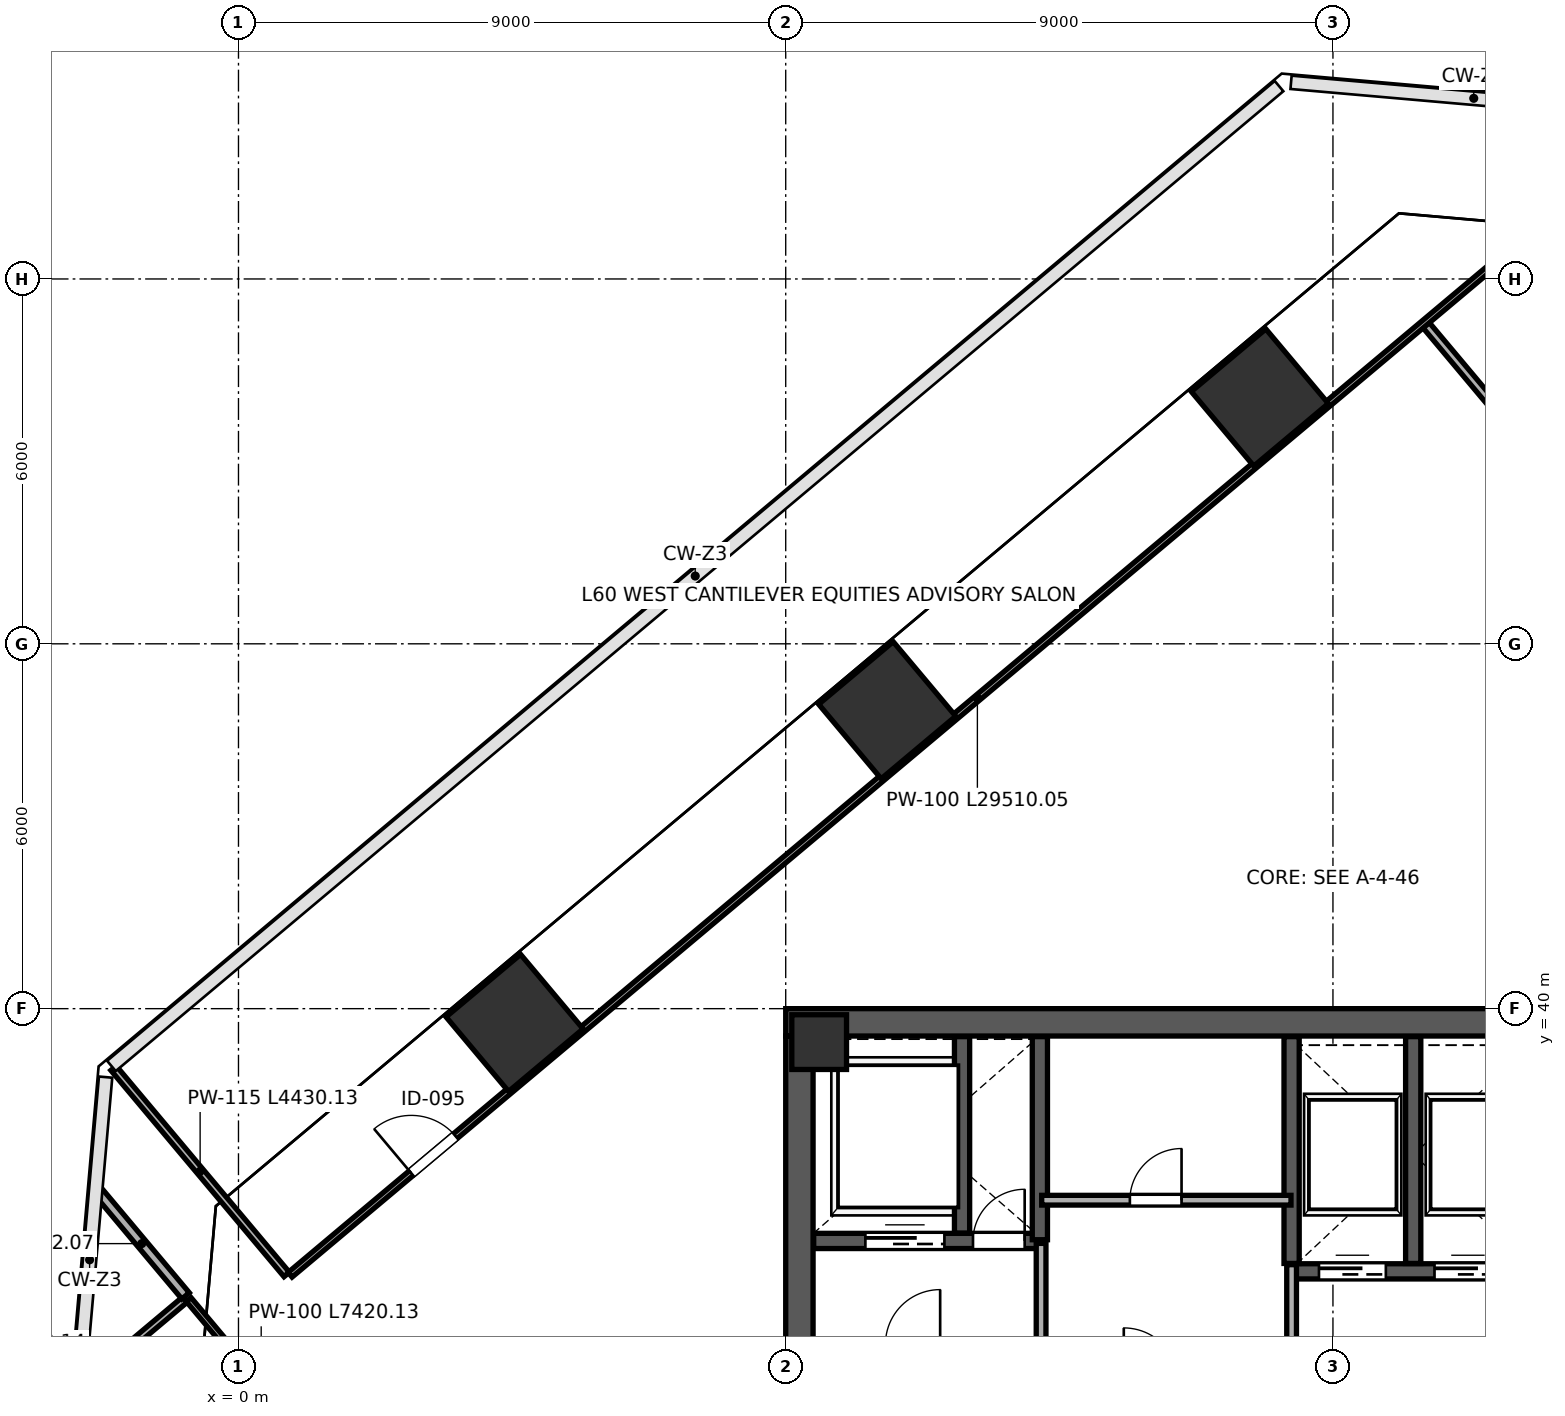
"""IFC4 building model, lengths in metres.
Left out: names, types, materials, properties, quantities, classifications, styles, units other than length and angle.
Written with IfcOpenShell. Run it as: python <this file> out.ifc"""

import sys

from ifc_helpers import new_model, si_unit, direction, frame, frame_2d, origin, origin_2d, place, context, subcontext, project, spatial, rectangle, extrude, source, transform, mapped, element, fill, save


model = new_model("IFC4")
c1 = context("Model", 3, precision=1e-05, world=origin(), true_north=direction((0.0, 1.0)))
c2 = subcontext(c1, "Body", "Model", "MODEL_VIEW")
j1 = project(units=[si_unit("LENGTHUNIT", "METRE"), si_unit("PLANEANGLEUNIT", "RADIAN")], contexts=[c1])
p1 = place(None, origin())
s1 = spatial("IfcSite", under=j1, at=p1, CompositionType="ELEMENT")
p2 = place(p1, origin())
s2 = spatial("IfcBuilding", under=s1, at=p2, CompositionType="ELEMENT")
p3 = place(p2, frame((0.0, 0.0, 266.8)))
s3 = spatial("IfcBuildingStorey", under=s2, at=p3, CompositionType="ELEMENT", Elevation=266.8)
m1 = source(origin(), c2, "Body", "SweptSolid", [
    extrude(rectangle(XDim=0.9, YDim=0.9, at=origin_2d()), origin(), (0.0, 0.0, 1.0), 4.198),
])
p4 = place(p3, frame((9.55, 39.45, 0.001), z_axis=(0.0, 0.0, 1.0), x_axis=(1.0, 0.0, 0.0)))
e1 = element("IfcColumn", 1, at=p4, inside=s3, PredefinedType="COLUMN", context=c2, shape_type="MappedRepresentation", body=[
    mapped(m1, transform((0.0, 0.0, 0.0), scale=1.0)),
])
m2 = source(origin(), c2, "Body", "SweptSolid", [
    extrude(rectangle(XDim=1.6, YDim=1.6, at=origin_2d()), origin(), (0.0, 0.0, 1.0), 4.198),
])
for number, where, z_axis, x_axis in (
    (2, (4.541, 39.765, 0.001), (0.0, 0.0, 1.0), (-0.643, 0.766, 0.0)),
    (3, (10.669, 44.908, 0.001), (0.0, 0.0, 1.0), (-0.643, 0.766, 0.0)),
    (4, (16.797, 50.05, 0.001), (0.0, 0.0, 1.0), (-0.643, 0.766, 0.0)),
):
    element("IfcColumn", number, at=place(p3, frame(where, z_axis=z_axis, x_axis=x_axis)), inside=s3, PredefinedType="COLUMN", context=c2, shape_type="MappedRepresentation", body=[
        mapped(m2, transform((0.0, 0.0, 0.0), scale=1.0)),
    ])
p5 = place(p3, frame((9.225, 24.45, 0.0), z_axis=(0.0, 0.0, 1.0), x_axis=(0.0, 1.0, 0.0)))
e5 = element("IfcWall", 5, at=p5, inside=s3, PredefinedType="SHEAR", context=c2, shape_type="SweptSolid", body=[
    extrude(rectangle(XDim=15.1, YDim=0.45, at=frame_2d((7.55, 0.0))), origin(), (0.0, 0.0, 1.0), 3.96),
])
p6 = place(p5, frame((8.7, 0.0, 0.0)))
e6 = element("IfcOpeningElement", 6, at=p6, cuts=e5, PredefinedType="OPENING", context=c2, shape_type="SweptSolid", body=[
    extrude(rectangle(XDim=1.15, YDim=2.2, at=frame_2d((0.575, 1.1))), frame((0.0, 0.235, 0.0), z_axis=(0.0, -1.0, 0.0), x_axis=(1.0, 0.0, 0.0)), (0.0, 0.0, 1.0), 0.47),
])
p7 = place(p3, frame((9.0, 39.775, 0.0), z_axis=(0.0, 0.0, 1.0), x_axis=(1.0, 0.0, 0.0)))
e7 = element("IfcWall", 7, at=p7, inside=s3, PredefinedType="SHEAR", context=c2, shape_type="SweptSolid", body=[
    extrude(rectangle(XDim=18.0, YDim=0.45, at=frame_2d((9.0, 0.0))), origin(), (0.0, 0.0, 1.0), 3.96),
])
p8 = place(p3, frame((9.46, 36.18, 0.0), z_axis=(0.0, 0.0, 1.0), x_axis=(1.0, 0.0, 0.0)))
e8 = element("IfcWall", 8, at=p8, inside=s3, PredefinedType="SHEAR", context=c2, shape_type="SweptSolid", body=[
    extrude(rectangle(XDim=3.79, YDim=0.25, at=frame_2d((1.895, 0.0))), origin(), (0.0, 0.0, 1.0), 3.96),
])
p9 = place(p8, frame((2.62, 0.0, 0.0)))
e9 = element("IfcOpeningElement", 9, at=p9, cuts=e8, PredefinedType="OPENING", context=c2, shape_type="SweptSolid", body=[
    extrude(rectangle(XDim=0.85, YDim=2.1, at=frame_2d((0.425, 1.05))), frame((0.0, 0.135, 0.0), z_axis=(0.0, -1.0, 0.0), x_axis=(1.0, 0.0, 0.0)), (0.0, 0.0, 1.0), 0.27),
])
p10 = place(p8, frame((0.85, 0.0, 0.0)))
e10 = element("IfcOpeningElement", 10, at=p10, cuts=e8, PredefinedType="OPENING", context=c2, shape_type="SweptSolid", body=[
    extrude(rectangle(XDim=1.3, YDim=2.25, at=frame_2d((0.65, 1.125))), frame((0.0, 0.135, 0.0), z_axis=(0.0, -1.0, 0.0), x_axis=(1.0, 0.0, 0.0)), (0.0, 0.0, 1.0), 0.27),
])
p11 = place(p3, frame((11.9, 36.31, 0.0), z_axis=(0.0, 0.0, 1.0), x_axis=(0.0, 1.0, 0.0)))
e11 = element("IfcWall", 11, at=p11, inside=s3, PredefinedType="SHEAR", context=c2, shape_type="SweptSolid", body=[
    extrude(rectangle(XDim=3.23, YDim=0.25, at=frame_2d((1.615, 0.0))), origin(), (0.0, 0.0, 1.0), 3.96),
])
p12 = place(p3, frame((13.18, 36.2, 0.0), z_axis=(0.0, 0.0, 1.0), x_axis=(0.0, 1.0, 0.0)))
e12 = element("IfcWall", 12, at=p12, inside=s3, PredefinedType="SHEAR", context=c2, shape_type="SweptSolid", body=[
    extrude(rectangle(XDim=3.34, YDim=0.25, at=frame_2d((1.67, 0.0))), origin(), (0.0, 0.0, 1.0), 3.96),
])
p13 = place(p3, frame((17.32, 35.68, 0.0), z_axis=(0.0, 0.0, 1.0), x_axis=(1.0, 0.0, 0.0)))
e13 = element("IfcWall", 13, at=p13, inside=s3, PredefinedType="SHEAR", context=c2, shape_type="SweptSolid", body=[
    extrude(rectangle(XDim=3.87, YDim=0.25, at=frame_2d((1.935, 0.0))), origin(), (0.0, 0.0, 1.0), 3.96),
])
p14 = place(p13, frame((0.45, 0.0, 0.0)))
e14 = element("IfcOpeningElement", 14, at=p14, cuts=e13, PredefinedType="OPENING", context=c2, shape_type="SweptSolid", body=[
    extrude(rectangle(XDim=1.1, YDim=2.2, at=frame_2d((0.55, 1.1))), frame((0.0, 0.135, 0.0), z_axis=(0.0, -1.0, 0.0), x_axis=(1.0, 0.0, 0.0)), (0.0, 0.0, 1.0), 0.27),
])
p15 = place(p13, frame((2.35, 0.0, 0.0)))
e15 = element("IfcOpeningElement", 15, at=p15, cuts=e13, PredefinedType="OPENING", context=c2, shape_type="SweptSolid", body=[
    extrude(rectangle(XDim=1.1, YDim=2.2, at=frame_2d((0.55, 1.1))), frame((0.0, 0.135, 0.0), z_axis=(0.0, -1.0, 0.0), x_axis=(1.0, 0.0, 0.0)), (0.0, 0.0, 1.0), 0.27),
])
for number, where, z_axis, x_axis in (
    (16, (17.32, 35.81, 0.0), (0.0, 0.0, 1.0), (0.0, 1.0, 0.0)),
    (17, (19.32, 35.81, 0.0), (0.0, 0.0, 1.0), (0.0, 1.0, 0.0)),
):
    element("IfcWall", number, at=place(p3, frame(where, z_axis=z_axis, x_axis=x_axis)), inside=s3, PredefinedType="SHEAR", context=c2, shape_type="SweptSolid", body=[
        extrude(rectangle(XDim=3.73, YDim=0.25, at=frame_2d((1.865, 0.0))), origin(), (0.0, 0.0, 1.0), 3.96),
    ])
p16 = place(p3, frame((13.2, 34.57, 0.0), z_axis=(0.0, 0.0, 1.0), x_axis=(0.0, 1.0, 0.0)))
e18 = element("IfcWall", 18, at=p16, inside=s3, PredefinedType="PARTITIONING", context=c2, shape_type="SweptSolid", body=[
    extrude(rectangle(XDim=1.57, YDim=0.16, at=frame_2d((0.785, 0.0))), origin(), (0.0, 0.0, 1.0), 3.96),
])
p17 = place(p3, frame((17.32, 33.86, 0.0), z_axis=(0.0, 0.0, 1.0), x_axis=(0.0, 1.0, 0.0)))
e19 = element("IfcWall", 19, at=p17, inside=s3, PredefinedType="PARTITIONING", context=c2, shape_type="SweptSolid", body=[
    extrude(rectangle(XDim=1.93, YDim=0.16, at=frame_2d((0.965, 0.0))), origin(), (0.0, 0.0, 1.0), 3.96),
])
p18 = place(p3, frame((13.21, 36.85, 0.0), z_axis=(0.0, 0.0, 1.0), x_axis=(1.0, 0.0, 0.0)))
e20 = element("IfcWall", 20, at=p18, inside=s3, PredefinedType="PARTITIONING", context=c2, shape_type="SweptSolid", body=[
    extrude(rectangle(XDim=4.1, YDim=0.16, at=frame_2d((2.05, 0.0))), origin(), (0.0, 0.0, 1.0), 3.96),
])
p19 = place(p18, frame((1.45, 0.0, 0.0)))
e21 = element("IfcOpeningElement", 21, at=p19, cuts=e20, PredefinedType="OPENING", context=c2, shape_type="SweptSolid", body=[
    extrude(rectangle(XDim=0.85, YDim=2.1, at=frame_2d((0.425, 1.05))), frame((0.0, 0.09, 0.0), z_axis=(0.0, -1.0, 0.0), x_axis=(1.0, 0.0, 0.0)), (0.0, 0.0, 1.0), 0.18),
])
p20 = place(p3, frame((-2.593, 33.78, 0.0), z_axis=(0.0, 0.0, 1.0), x_axis=(0.765994359698, 0.642847292062, 0.0)))
e22 = element("IfcWall", 22, at=p20, inside=s3, PredefinedType="PARTITIONING", context=c2, shape_type="SweptSolid", body=[
    extrude(rectangle(XDim=2.242, YDim=0.115, at=frame_2d((1.121, 0.0))), origin(), (0.0, 0.0, 1.0), 3.96),
])
p21 = place(p3, frame((-2.312, 36.995, 0.0), z_axis=(0.0, 0.0, 1.0), x_axis=(0.642783398336, -0.766047976842, 0.0)))
e23 = element("IfcWall", 23, at=p21, inside=s3, PredefinedType="PARTITIONING", context=c2, shape_type="SweptSolid", body=[
    extrude(rectangle(XDim=2.242, YDim=0.16, at=frame_2d((1.121, 0.0))), origin(), (0.0, 0.0, 1.0), 3.96),
])
p22 = place(p3, frame((-0.819, 35.216, 0.0), z_axis=(0.0, 0.0, 1.0), x_axis=(0.642772999209, -0.766056702528, 0.0)))
e24 = element("IfcWall", 24, at=p22, inside=s3, PredefinedType="PARTITIONING", context=c2, shape_type="SweptSolid", body=[
    extrude(rectangle(XDim=7.42, YDim=0.1, at=frame_2d((3.71, 0.0))), origin(), (0.0, 0.0, 1.0), 3.96),
])
p23 = place(p22, frame((2.9, 0.0, 0.0)))
e25 = element("IfcOpeningElement", 25, at=p23, cuts=e24, PredefinedType="OPENING", context=c2, shape_type="SweptSolid", body=[
    extrude(rectangle(XDim=0.9, YDim=2.15, at=frame_2d((0.45, 1.075))), frame((0.0, 0.06, 0.0), z_axis=(0.0, -1.0, 0.0), x_axis=(1.0, 0.0, 0.0)), (0.0, 0.0, 1.0), 0.12),
])
p24 = place(p22, frame((5.0, 0.0, 0.0)))
e26 = element("IfcOpeningElement", 26, at=p24, cuts=e24, PredefinedType="OPENING", context=c2, shape_type="SweptSolid", body=[
    extrude(rectangle(XDim=0.95, YDim=2.15, at=frame_2d((0.475, 1.075))), frame((0.0, 0.06, 0.0), z_axis=(0.0, -1.0, 0.0), x_axis=(1.0, 0.0, 0.0)), (0.0, 0.0, 1.0), 0.12),
])
p25 = place(p3, frame((19.528, 51.245, 0.0), z_axis=(0.0, 0.0, 1.0), x_axis=(0.642782364439, -0.766048844374, 0.0)))
e27 = element("IfcWall", 27, at=p25, inside=s3, PredefinedType="PARTITIONING", context=c2, shape_type="SweptSolid", body=[
    extrude(rectangle(XDim=27.34, YDim=0.135, at=frame_2d((13.67, 0.0))), origin(), (0.0, 0.0, 1.0), 3.96),
])
p26 = place(p25, frame((10.8, 0.0, 0.0)))
e28 = element("IfcOpeningElement", 28, at=p26, cuts=e27, PredefinedType="OPENING", context=c2, shape_type="SweptSolid", body=[
    extrude(rectangle(XDim=0.95, YDim=2.15, at=frame_2d((0.475, 1.075))), frame((0.0, 0.078, 0.0), z_axis=(0.0, -1.0, 0.0), x_axis=(1.0, 0.0, 0.0)), (0.0, 0.0, 1.0), 0.155),
])
p27 = place(p3, frame((-2.055, 39.022, 0.0), z_axis=(0.0, 0.0, 1.0), x_axis=(0.642777132802, -0.766053234147, 0.0)))
e29 = element("IfcWall", 29, at=p27, inside=s3, PredefinedType="PARTITIONING", context=c2, shape_type="SweptSolid", body=[
    extrude(rectangle(XDim=4.43, YDim=0.115, at=frame_2d((2.215, 0.0))), origin(), (0.0, 0.0, 1.0), 3.96),
])
p28 = place(p3, frame((0.849, 35.624, 0.0), z_axis=(0.0, 0.0, 1.0), x_axis=(0.766042777978, 0.642789594119, 0.0)))
e30 = element("IfcWall", 30, at=p28, inside=s3, PredefinedType="PARTITIONING", context=c2, shape_type="SweptSolid", body=[
    extrude(rectangle(XDim=29.51, YDim=0.1, at=frame_2d((14.755, 0.0))), origin(), (0.0, 0.0, 1.0), 3.96),
])
p29 = place(p28, frame((2.6, 0.0, 0.0)))
e31 = element("IfcOpeningElement", 31, at=p29, cuts=e30, PredefinedType="OPENING", context=c2, shape_type="SweptSolid", body=[
    extrude(rectangle(XDim=0.95, YDim=2.15, at=frame_2d((0.475, 1.075))), frame((0.0, 0.06, 0.0), z_axis=(0.0, -1.0, 0.0), x_axis=(1.0, 0.0, 0.0)), (0.0, 0.0, 1.0), 0.12),
])
m3 = source(origin(), c2, "Body", "SweptSolid", [
    extrude(rectangle(XDim=0.85, YDim=2.1, at=frame_2d((0.425, 1.05))), frame((0.0, 0.025, 0.0), z_axis=(0.0, -1.0, 0.0), x_axis=(1.0, 0.0, 0.0)), (0.0, 0.0, 1.0), 0.05),
])
p30 = place(p9, origin())
e32 = element("IfcDoor", 32, at=p30, inside=s3, OperationType="SINGLE_SWING_RIGHT", PredefinedType="DOOR", context=c2, shape_type="MappedRepresentation", body=[
    mapped(m3, transform((0.0, 0.0, 0.0), scale=1.0)),
])
fill(e9, e32)
m4 = source(origin(), c2, "Body", "SweptSolid", [
    extrude(rectangle(XDim=1.1, YDim=2.2, at=frame_2d((0.55, 1.1))), frame((0.0, 0.025, 0.0), z_axis=(0.0, -1.0, 0.0), x_axis=(1.0, 0.0, 0.0)), (0.0, 0.0, 1.0), 0.05),
])
p31 = place(p14, origin())
e33 = element("IfcDoor", 33, at=p31, inside=s3, OperationType="SLIDING_TO_LEFT", PredefinedType="DOOR", context=c2, shape_type="MappedRepresentation", body=[
    mapped(m4, transform((0.0, 0.0, 0.0), scale=1.0)),
])
fill(e14, e33)
p32 = place(p15, origin())
e34 = element("IfcDoor", 34, at=p32, inside=s3, OperationType="SLIDING_TO_RIGHT", PredefinedType="DOOR", context=c2, shape_type="MappedRepresentation", body=[
    mapped(m4, transform((0.0, 0.0, 0.0), scale=1.0)),
])
fill(e15, e34)
m5 = source(origin(), c2, "Body", "SweptSolid", [
    extrude(rectangle(XDim=1.3, YDim=2.25, at=frame_2d((0.65, 1.125))), frame((0.0, 0.025, 0.0), z_axis=(0.0, -1.0, 0.0), x_axis=(1.0, 0.0, 0.0)), (0.0, 0.0, 1.0), 0.05),
])
p33 = place(p10, origin())
e35 = element("IfcDoor", 35, at=p33, inside=s3, OperationType="SLIDING_TO_LEFT", PredefinedType="DOOR", context=c2, shape_type="MappedRepresentation", body=[
    mapped(m5, transform((0.0, 0.0, 0.0), scale=1.0)),
])
fill(e10, e35)
p34 = place(p19, origin())
e36 = element("IfcDoor", 36, at=p34, inside=s3, OperationType="SINGLE_SWING_RIGHT", PredefinedType="DOOR", context=c2, shape_type="MappedRepresentation", body=[
    mapped(m3, transform((0.0, 0.0, 0.0), scale=1.0)),
])
fill(e21, e36)
m6 = source(origin(), c2, "Body", "SweptSolid", [
    extrude(rectangle(XDim=0.95, YDim=2.15, at=frame_2d((0.475, 1.075))), frame((0.0, 0.025, 0.0), z_axis=(0.0, -1.0, 0.0), x_axis=(1.0, 0.0, 0.0)), (0.0, 0.0, 1.0), 0.05),
])
p35 = place(p29, origin())
e37 = element("IfcDoor", 37, at=p35, inside=s3, OperationType="SINGLE_SWING_LEFT", PredefinedType="DOOR", context=c2, shape_type="MappedRepresentation", body=[
    mapped(m6, transform((0.0, 0.0, 0.0), scale=1.0)),
])
fill(e31, e37)
save(model, sys.argv[1])
